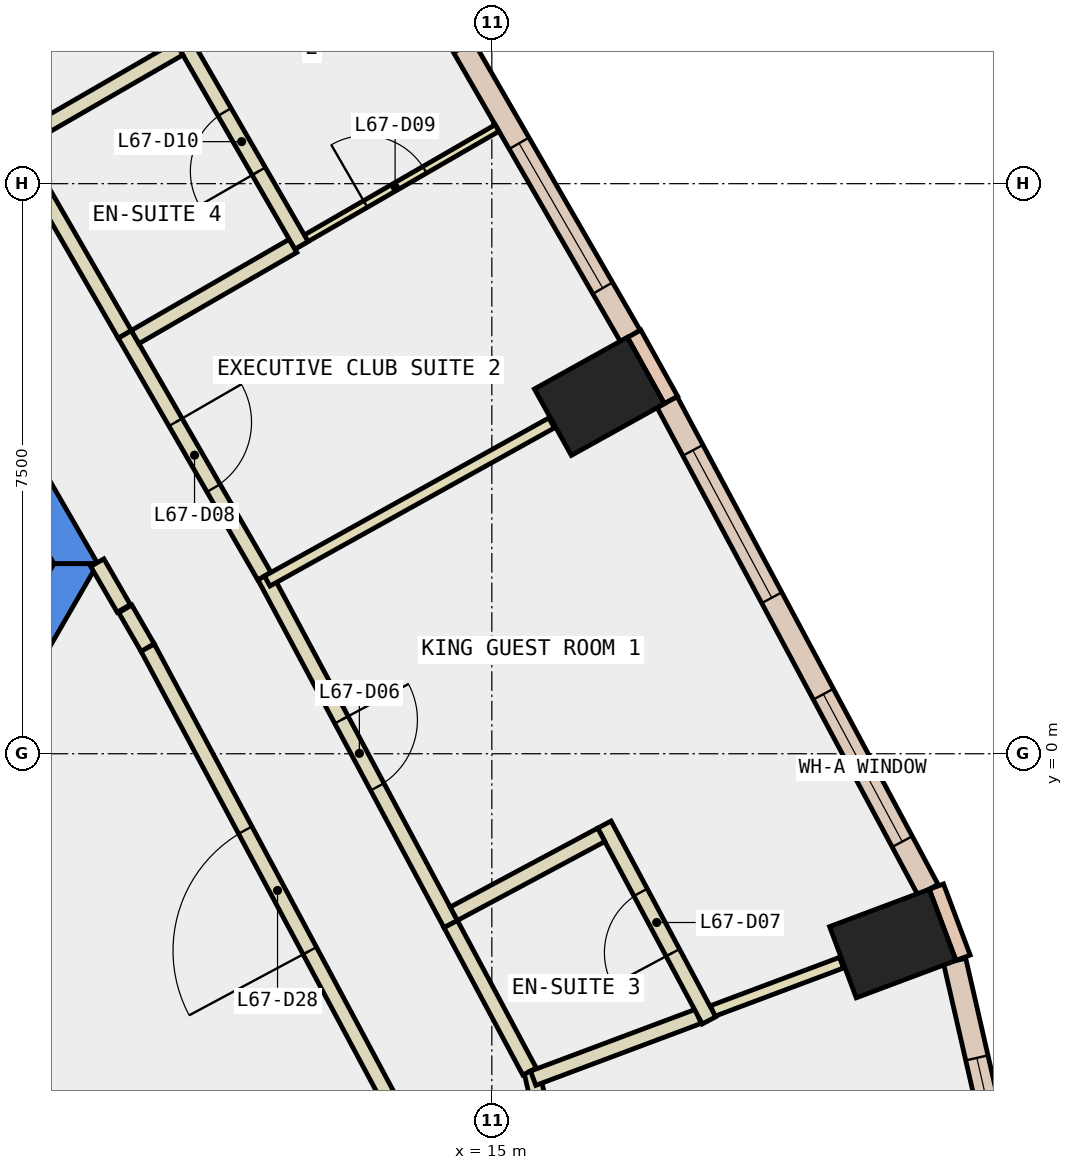
"""IFC4 building model, lengths in metres.
Left out: names, types, materials, properties, quantities, classifications, styles, units other than length and angle.
Written with IfcOpenShell. Run it as: python <this file> out.ifc"""

import sys

from ifc_helpers import new_model, si_unit, direction, frame, frame_2d, origin, origin_2d, place, context, subcontext, project, spatial, polyline, rectangle, outline, extrude, element, fill, save


model = new_model("IFC4")
c1 = context("Model", 3, precision=1e-05, world=origin(), true_north=direction((0.0, 1.0)))
c2 = subcontext(c1, "Body", "Model", "MODEL_VIEW")
j1 = project(units=[si_unit("LENGTHUNIT", "METRE"), si_unit("PLANEANGLEUNIT", "RADIAN")], contexts=[c1])
p1 = place(None, origin())
s1 = spatial("IfcSite", under=j1, at=p1, CompositionType="ELEMENT")
p2 = place(p1, origin())
s2 = spatial("IfcBuilding", under=s1, at=p2, CompositionType="ELEMENT")
p3 = place(p2, frame((0.0, 0.0, 290.0)))
s3 = spatial("IfcBuildingStorey", under=s2, at=p3, CompositionType="ELEMENT", Elevation=290.0)
for number, where, z_axis, x_axis in (
    (1, (20.275, -2.497, -0.34), (0.0, 0.0, 1.0), (-0.351, 0.936, 0.0)),
    (2, (16.415, 4.702, -0.34), (0.0, 0.0, 1.0), (-0.486, 0.874, 0.0)),
):
    element("IfcColumn", number, at=place(p3, frame(where, z_axis=z_axis, x_axis=x_axis)), inside=s3, PredefinedType="COLUMN", context=c2, shape_type="SweptSolid", body=[
        extrude(rectangle(XDim=1.0, YDim=1.4, at=origin_2d()), origin(), (0.0, 0.0, 1.0), 3.6),
    ])
p4 = place(p3, frame((0.0, 0.0, -0.34)))
e3 = element("IfcWall", 3, at=p4, inside=s3, PredefinedType="SHEAR", context=c2, shape_type="SweptSolid", body=[
    extrude(outline(polyline([(5.486, 9.998), (5.053, 9.748), (9.238, 2.5), (9.815, 2.5), (5.486, 9.998)])), origin(), (0.0, 0.0, 1.0), 3.6),
])
p5 = place(p3, frame((0.0, 0.0, -0.34)))
e4 = element("IfcWall", 4, at=p5, inside=s3, PredefinedType="SHEAR", context=c2, shape_type="SweptSolid", body=[
    extrude(outline(polyline([(4.907, -6.0), (9.815, 2.5), (9.238, 2.5), (4.619, -5.5), (4.907, -6.0)])), origin(), (0.0, 0.0, 1.0), 3.6),
])
p6 = place(p3, frame((6.279, -3.625, -0.34), z_axis=(0.0, 0.0, 1.0), x_axis=(0.866017533419, -0.500013631625, 0.0)))
e5 = element("IfcWall", 5, at=p6, inside=s3, PredefinedType="SHEAR", context=c2, shape_type="SweptSolid", body=[
    extrude(rectangle(XDim=9.0, YDim=0.8, at=frame_2d((4.5, 0.0))), origin(), (0.0, 0.0, 1.0), 3.6),
])
p7 = place(p3, frame((21.2, -2.684, 0.0), z_axis=(0.0, 0.0, 1.0), x_axis=(-0.350962844851, 0.936389385637, 0.0)))
e6 = element("IfcWall", 6, at=p7, inside=s3, PredefinedType="STANDARD", context=c2, shape_type="SweptSolid", body=[
    extrude(rectangle(XDim=1.0, YDim=0.2, at=frame_2d((0.5, 0.0))), origin(), (0.0, 0.0, 1.0), 3.26),
])
p8 = place(p3, frame((17.358, 4.653, 0.0), z_axis=(0.0, 0.0, 1.0), x_axis=(-0.485850211157, 0.874042088414, 0.0)))
e7 = element("IfcWall", 7, at=p8, inside=s3, PredefinedType="STANDARD", context=c2, shape_type="SweptSolid", body=[
    extrude(rectangle(XDim=1.0, YDim=0.2, at=frame_2d((0.5, 0.0))), origin(), (0.0, 0.0, 1.0), 3.26),
])
p9 = place(p3, frame((21.987, -6.642, 0.0), z_axis=(0.0, 0.0, 1.0), x_axis=(-0.223448307338, 0.974715781112, 0.0)))
e8 = element("IfcWall", 8, at=p9, inside=s3, PredefinedType="STANDARD", context=c2, shape_type="SweptSolid", body=[
    extrude(rectangle(XDim=4.019, YDim=0.3, at=frame_2d((2.009, 0.0))), origin(), (0.0, 0.0, 1.0), 3.26),
])
p10 = place(p9, frame((1.309, 0.0, 0.9)))
e9 = element("IfcOpeningElement", 9, at=p10, cuts=e8, PredefinedType="OPENING", context=c2, shape_type="SweptSolid", body=[
    extrude(rectangle(XDim=1.4, YDim=2.0, at=frame_2d((0.7, 1.0))), frame((0.0, 0.16, 0.0), z_axis=(0.0, -1.0, 0.0), x_axis=(1.0, 0.0, 0.0)), (0.0, 0.0, 1.0), 0.32),
])
p11 = place(p3, frame((20.739, -1.79, 0.0), z_axis=(0.0, 0.0, 1.0), x_axis=(-0.471789353675, 0.881711293882, 0.0)))
e10 = element("IfcWall", 10, at=p11, inside=s3, PredefinedType="STANDARD", context=c2, shape_type="SweptSolid", body=[
    extrude(rectangle(XDim=7.277, YDim=0.3, at=frame_2d((3.638, 0.0))), origin(), (0.0, 0.0, 1.0), 3.26),
])
p12 = place(p11, frame((0.719, 0.0, 0.9)))
e11 = element("IfcOpeningElement", 11, at=p12, cuts=e10, PredefinedType="OPENING", context=c2, shape_type="SweptSolid", body=[
    extrude(rectangle(XDim=2.2, YDim=2.0, at=frame_2d((1.1, 1.0))), frame((0.0, 0.16, 0.0), z_axis=(0.0, -1.0, 0.0), x_axis=(1.0, 0.0, 0.0)), (0.0, 0.0, 1.0), 0.32),
])
p13 = place(p11, frame((4.358, 0.0, 0.9)))
e12 = element("IfcOpeningElement", 12, at=p13, cuts=e10, PredefinedType="OPENING", context=c2, shape_type="SweptSolid", body=[
    extrude(rectangle(XDim=2.2, YDim=2.0, at=frame_2d((1.1, 1.0))), frame((0.0, 0.16, 0.0), z_axis=(0.0, -1.0, 0.0), x_axis=(1.0, 0.0, 0.0)), (0.0, 0.0, 1.0), 0.32),
])
p14 = place(p3, frame((16.821, 5.498, 0.0), z_axis=(0.0, 0.0, 1.0), x_axis=(-0.499945412946, 0.866056917341, 0.0)))
e13 = element("IfcWall", 13, at=p14, inside=s3, PredefinedType="STANDARD", context=c2, shape_type="SweptSolid", body=[
    extrude(rectangle(XDim=7.299, YDim=0.3, at=frame_2d((3.649, 0.0))), origin(), (0.0, 0.0, 1.0), 3.26),
])
p15 = place(p14, frame((0.725, 0.0, 0.9)))
e14 = element("IfcOpeningElement", 14, at=p15, cuts=e13, PredefinedType="OPENING", context=c2, shape_type="SweptSolid", body=[
    extrude(rectangle(XDim=2.2, YDim=2.0, at=frame_2d((1.1, 1.0))), frame((0.0, 0.16, 0.0), z_axis=(0.0, -1.0, 0.0), x_axis=(1.0, 0.0, 0.0)), (0.0, 0.0, 1.0), 0.32),
])
p16 = place(p14, frame((4.374, 0.0, 0.9)))
e15 = element("IfcOpeningElement", 15, at=p16, cuts=e13, PredefinedType="OPENING", context=c2, shape_type="SweptSolid", body=[
    extrude(rectangle(XDim=2.2, YDim=2.0, at=frame_2d((1.1, 1.0))), frame((0.0, 0.16, 0.0), z_axis=(0.0, -1.0, 0.0), x_axis=(1.0, 0.0, 0.0)), (0.0, 0.0, 1.0), 0.32),
])
p17 = place(p3, frame((13.89, -4.994, 0.0), z_axis=(0.0, 0.0, 1.0), x_axis=(-0.471713767504, 0.881751734644, 0.0)))
e16 = element("IfcWall", 16, at=p17, inside=s3, PredefinedType="PARTITIONING", context=c2, shape_type="SweptSolid", body=[
    extrude(rectangle(XDim=7.248, YDim=0.2, at=frame_2d((3.624, 0.0))), origin(), (0.0, 0.0, 1.0), 3.26),
])
p18 = place(p17, frame((2.724, 0.0, 0.0)))
e17 = element("IfcOpeningElement", 17, at=p18, cuts=e16, PredefinedType="OPENING", context=c2, shape_type="SweptSolid", body=[
    extrude(rectangle(XDim=1.8, YDim=2.1, at=frame_2d((0.9, 1.05))), frame((0.0, 0.11, 0.0), z_axis=(0.0, -1.0, 0.0), x_axis=(1.0, 0.0, 0.0)), (0.0, 0.0, 1.0), 0.22),
])
p19 = place(p3, frame((10.471, 1.397, 0.0), z_axis=(0.0, 0.0, 1.0), x_axis=(-0.500069990121, 0.865984991198, 0.0)))
e18 = element("IfcWall", 18, at=p19, inside=s3, PredefinedType="PARTITIONING", context=c2, shape_type="SweptSolid", body=[
    extrude(rectangle(XDim=0.588, YDim=0.2, at=frame_2d((0.294, 0.0))), origin(), (0.0, 0.0, 1.0), 3.26),
])
p20 = place(p3, frame((10.157, 1.912, 0.0), z_axis=(0.0, 0.0, 1.0), x_axis=(-0.500482383858, 0.865746720148, 0.0)))
e19 = element("IfcWall", 19, at=p20, inside=s3, PredefinedType="PARTITIONING", context=c2, shape_type="SweptSolid", body=[
    extrude(rectangle(XDim=0.695, YDim=0.2, at=frame_2d((0.348, 0.0))), origin(), (0.0, 0.0, 1.0), 3.26),
])
p21 = place(p3, frame((15.521, -4.171, 0.0), z_axis=(0.0, 0.0, 1.0), x_axis=(0.223416387785, -0.974723097946, 0.0)))
e20 = element("IfcWall", 20, at=p21, inside=s3, PredefinedType="PARTITIONING", context=c2, shape_type="SweptSolid", body=[
    extrude(rectangle(XDim=3.003, YDim=0.2, at=frame_2d((1.501, 0.0))), origin(), (0.0, 0.0, 1.0), 3.26),
])
p22 = place(p3, frame((12.009, 2.338, 0.0), z_axis=(0.0, 0.0, 1.0), x_axis=(0.471771260231, -0.88172097515, 0.0)))
e21 = element("IfcWall", 21, at=p22, inside=s3, PredefinedType="PARTITIONING", context=c2, shape_type="SweptSolid", body=[
    extrude(rectangle(XDim=5.193, YDim=0.2, at=frame_2d((2.597, 0.0))), origin(), (0.0, 0.0, 1.0), 3.26),
])
p23 = place(p22, frame((2.146, 0.0, 0.0)))
e22 = element("IfcOpeningElement", 22, at=p23, cuts=e21, PredefinedType="OPENING", context=c2, shape_type="SweptSolid", body=[
    extrude(rectangle(XDim=1.0, YDim=2.1, at=frame_2d((0.5, 1.05))), frame((0.0, 0.11, 0.0), z_axis=(0.0, -1.0, 0.0), x_axis=(1.0, 0.0, 0.0)), (0.0, 0.0, 1.0), 0.22),
])
p24 = place(p3, frame((14.459, -2.241, 0.0), z_axis=(0.0, 0.0, 1.0), x_axis=(0.471648235011, -0.881786789656, 0.0)))
e23 = element("IfcWall", 23, at=p24, inside=s3, PredefinedType="PARTITIONING", context=c2, shape_type="SweptSolid", body=[
    extrude(rectangle(XDim=2.199, YDim=0.2, at=frame_2d((1.1, 0.0))), origin(), (0.0, 0.0, 1.0), 3.26),
])
p25 = place(p3, frame((10.17, 5.519, 0.0), z_axis=(0.0, 0.0, 1.0), x_axis=(0.499990860175, -0.866030680601, 0.0)))
e24 = element("IfcWall", 24, at=p25, inside=s3, PredefinedType="PARTITIONING", context=c2, shape_type="SweptSolid", body=[
    extrude(rectangle(XDim=3.674, YDim=0.2, at=frame_2d((1.837, 0.0))), origin(), (0.0, 0.0, 1.0), 3.26),
])
p26 = place(p25, frame((1.337, 0.0, 0.0)))
e25 = element("IfcOpeningElement", 25, at=p26, cuts=e24, PredefinedType="OPENING", context=c2, shape_type="SweptSolid", body=[
    extrude(rectangle(XDim=1.0, YDim=2.1, at=frame_2d((0.5, 1.05))), frame((0.0, 0.11, 0.0), z_axis=(0.0, -1.0, 0.0), x_axis=(1.0, 0.0, 0.0)), (0.0, 0.0, 1.0), 0.22),
])
p27 = place(p3, frame((8.67, 8.117, 0.0), z_axis=(0.0, 0.0, 1.0), x_axis=(0.50002537861, -0.866010750942, 0.0)))
e26 = element("IfcWall", 26, at=p27, inside=s3, PredefinedType="PARTITIONING", context=c2, shape_type="SweptSolid", body=[
    extrude(rectangle(XDim=3.0, YDim=0.2, at=frame_2d((1.5, 0.0))), origin(), (0.0, 0.0, 1.0), 3.26),
])
p28 = place(p3, frame((17.904, -3.385, 0.0), z_axis=(0.0, 0.0, 1.0), x_axis=(0.936401128709, 0.350931512054, 0.0)))
e27 = element("IfcWall", 27, at=p28, inside=s3, PredefinedType="PARTITIONING", context=c2, shape_type="SweptSolid", body=[
    extrude(rectangle(XDim=1.812, YDim=0.15, at=frame_2d((0.906, 0.0))), origin(), (0.0, 0.0, 1.0), 3.26),
])
p29 = place(p3, frame((15.544, -4.269, 0.0), z_axis=(0.0, 0.0, 1.0), x_axis=(0.936463142424, 0.350765994477, 0.0)))
e28 = element("IfcWall", 28, at=p29, inside=s3, PredefinedType="PARTITIONING", context=c2, shape_type="SweptSolid", body=[
    extrude(rectangle(XDim=2.321, YDim=0.2, at=frame_2d((1.16, 0.0))), origin(), (0.0, 0.0, 1.0), 3.26),
])
p30 = place(p3, frame((17.857, -3.508, 0.0), z_axis=(0.0, 0.0, 1.0), x_axis=(-0.47112614664, 0.882065844454, 0.0)))
e29 = element("IfcWall", 29, at=p30, inside=s3, PredefinedType="PARTITIONING", context=c2, shape_type="SweptSolid", body=[
    extrude(rectangle(XDim=2.921, YDim=0.2, at=frame_2d((1.46, 0.0))), origin(), (0.0, 0.0, 1.0), 3.26),
])
p31 = place(p30, frame((1.01, 0.0, 0.0)))
e30 = element("IfcOpeningElement", 30, at=p31, cuts=e29, PredefinedType="OPENING", context=c2, shape_type="SweptSolid", body=[
    extrude(rectangle(XDim=0.9, YDim=2.1, at=frame_2d((0.45, 1.05))), frame((0.0, 0.11, 0.0), z_axis=(0.0, -1.0, 0.0), x_axis=(1.0, 0.0, 0.0)), (0.0, 0.0, 1.0), 0.22),
])
p32 = place(p3, frame((16.44, -1.067, 0.0), z_axis=(0.0, 0.0, 1.0), x_axis=(-0.881700916894, -0.471808746367, 0.0)))
e31 = element("IfcWall", 31, at=p32, inside=s3, PredefinedType="PARTITIONING", context=c2, shape_type="SweptSolid", body=[
    extrude(rectangle(XDim=2.2, YDim=0.2, at=frame_2d((1.1, 0.0))), origin(), (0.0, 0.0, 1.0), 3.26),
])
p33 = place(p3, frame((12.045, 2.272, 0.0), z_axis=(0.0, 0.0, 1.0), x_axis=(0.873982340973, 0.485957680943, 0.0)))
e32 = element("IfcWall", 32, at=p33, inside=s3, PredefinedType="PARTITIONING", context=c2, shape_type="SweptSolid", body=[
    extrude(rectangle(XDim=4.28, YDim=0.15, at=frame_2d((2.14, 0.0))), origin(), (0.0, 0.0, 1.0), 3.26),
])
p34 = place(p3, frame((12.385, 6.682, 0.0), z_axis=(0.0, 0.0, 1.0), x_axis=(0.865970446821, 0.500095176175, 0.0)))
e33 = element("IfcWall", 33, at=p34, inside=s3, PredefinedType="PARTITIONING", context=c2, shape_type="SweptSolid", body=[
    extrude(rectangle(XDim=3.1, YDim=0.1, at=frame_2d((1.55, 0.0))), origin(), (0.0, 0.0, 1.0), 3.26),
])
p35 = place(p34, frame((1.1, 0.0, 0.0)))
e34 = element("IfcOpeningElement", 34, at=p35, cuts=e33, PredefinedType="OPENING", context=c2, shape_type="SweptSolid", body=[
    extrude(rectangle(XDim=0.9, YDim=2.1, at=frame_2d((0.45, 1.05))), frame((0.0, 0.06, 0.0), z_axis=(0.0, -1.0, 0.0), x_axis=(1.0, 0.0, 0.0)), (0.0, 0.0, 1.0), 0.12),
])
p36 = place(p3, frame((10.306, 5.482, 0.0), z_axis=(0.0, 0.0, 1.0), x_axis=(0.866100915363, 0.499869187296, 0.0)))
e35 = element("IfcWall", 35, at=p36, inside=s3, PredefinedType="PARTITIONING", context=c2, shape_type="SweptSolid", body=[
    extrude(rectangle(XDim=2.401, YDim=0.2, at=frame_2d((1.2, 0.0))), origin(), (0.0, 0.0, 1.0), 3.26),
])
p37 = place(p3, frame((12.496, 6.689, 0.0), z_axis=(0.0, 0.0, 1.0), x_axis=(-0.500039995618, 0.866002311072, 0.0)))
e36 = element("IfcWall", 36, at=p37, inside=s3, PredefinedType="PARTITIONING", context=c2, shape_type="SweptSolid", body=[
    extrude(rectangle(XDim=3.15, YDim=0.2, at=frame_2d((1.575, 0.0))), origin(), (0.0, 0.0, 1.0), 3.26),
])
p38 = place(p37, frame((1.125, 0.0, 0.0)))
e37 = element("IfcOpeningElement", 37, at=p38, cuts=e36, PredefinedType="OPENING", context=c2, shape_type="SweptSolid", body=[
    extrude(rectangle(XDim=0.9, YDim=2.1, at=frame_2d((0.45, 1.05))), frame((0.0, 0.11, 0.0), z_axis=(0.0, -1.0, 0.0), x_axis=(1.0, 0.0, 0.0)), (0.0, 0.0, 1.0), 0.22),
])
p39 = place(p3, frame((10.885, 9.28, 0.0), z_axis=(0.0, 0.0, 1.0), x_axis=(-0.866022959057, -0.500004234368, 0.0)))
e38 = element("IfcWall", 38, at=p39, inside=s3, PredefinedType="PARTITIONING", context=c2, shape_type="SweptSolid", body=[
    extrude(rectangle(XDim=2.5, YDim=0.2, at=frame_2d((1.25, 0.0))), origin(), (0.0, 0.0, 1.0), 3.26),
])
p40 = place(p3, frame((7.989, 9.295, 0.0), z_axis=(0.0, 0.0, 1.0), x_axis=(0.857801856135, 0.513980520654, 0.0)))
e39 = element("IfcWall", 39, at=p40, inside=s3, PredefinedType="PARTITIONING", context=c2, shape_type="SweptSolid", body=[
    extrude(rectangle(XDim=2.3, YDim=0.2, at=frame_2d((1.15, 0.0))), origin(), (0.0, 0.0, 1.0), 3.26),
])
p41 = place(p10, origin())
e40 = element("IfcWindow", 40, at=p41, inside=s3, PartitioningType="SINGLE_PANEL", PredefinedType="WINDOW", context=c2, shape_type="SweptSolid", body=[
    extrude(rectangle(XDim=1.4, YDim=2.0, at=frame_2d((0.7, 1.0))), frame((0.0, 0.03, 0.0), z_axis=(0.0, -1.0, 0.0), x_axis=(1.0, 0.0, 0.0)), (0.0, 0.0, 1.0), 0.06),
])
fill(e9, e40)
p42 = place(p12, origin())
e41 = element("IfcWindow", 41, at=p42, inside=s3, PartitioningType="SINGLE_PANEL", PredefinedType="WINDOW", context=c2, shape_type="SweptSolid", body=[
    extrude(rectangle(XDim=2.2, YDim=2.0, at=frame_2d((1.1, 1.0))), frame((0.0, 0.03, 0.0), z_axis=(0.0, -1.0, 0.0), x_axis=(1.0, 0.0, 0.0)), (0.0, 0.0, 1.0), 0.06),
])
fill(e11, e41)
p43 = place(p13, origin())
e42 = element("IfcWindow", 42, at=p43, inside=s3, PartitioningType="SINGLE_PANEL", PredefinedType="WINDOW", context=c2, shape_type="SweptSolid", body=[
    extrude(rectangle(XDim=2.2, YDim=2.0, at=frame_2d((1.1, 1.0))), frame((0.0, 0.03, 0.0), z_axis=(0.0, -1.0, 0.0), x_axis=(1.0, 0.0, 0.0)), (0.0, 0.0, 1.0), 0.06),
])
fill(e12, e42)
p44 = place(p15, origin())
e43 = element("IfcWindow", 43, at=p44, inside=s3, PartitioningType="SINGLE_PANEL", PredefinedType="WINDOW", context=c2, shape_type="SweptSolid", body=[
    extrude(rectangle(XDim=2.2, YDim=2.0, at=frame_2d((1.1, 1.0))), frame((0.0, 0.03, 0.0), z_axis=(0.0, -1.0, 0.0), x_axis=(1.0, 0.0, 0.0)), (0.0, 0.0, 1.0), 0.06),
])
fill(e14, e43)
p45 = place(p23, origin())
e44 = element("IfcDoor", 44, at=p45, inside=s3, OperationType="SINGLE_SWING_LEFT", PredefinedType="DOOR", context=c2, shape_type="SweptSolid", body=[
    extrude(rectangle(XDim=1.0, YDim=2.1, at=frame_2d((0.5, 1.05))), frame((0.0, 0.025, 0.0), z_axis=(0.0, -1.0, 0.0), x_axis=(1.0, 0.0, 0.0)), (0.0, 0.0, 1.0), 0.05),
])
fill(e22, e44)
p46 = place(p31, origin())
e45 = element("IfcDoor", 45, at=p46, inside=s3, OperationType="SINGLE_SWING_RIGHT", PredefinedType="DOOR", context=c2, shape_type="SweptSolid", body=[
    extrude(rectangle(XDim=0.9, YDim=2.1, at=frame_2d((0.45, 1.05))), frame((0.0, 0.025, 0.0), z_axis=(0.0, -1.0, 0.0), x_axis=(1.0, 0.0, 0.0)), (0.0, 0.0, 1.0), 0.05),
])
fill(e30, e45)
p47 = place(p26, origin())
e46 = element("IfcDoor", 46, at=p47, inside=s3, OperationType="SINGLE_SWING_LEFT", PredefinedType="DOOR", context=c2, shape_type="SweptSolid", body=[
    extrude(rectangle(XDim=1.0, YDim=2.1, at=frame_2d((0.5, 1.05))), frame((0.0, 0.025, 0.0), z_axis=(0.0, -1.0, 0.0), x_axis=(1.0, 0.0, 0.0)), (0.0, 0.0, 1.0), 0.05),
])
fill(e25, e46)
p48 = place(p35, origin())
e47 = element("IfcDoor", 47, at=p48, inside=s3, OperationType="SINGLE_SWING_RIGHT", PredefinedType="DOOR", context=c2, shape_type="SweptSolid", body=[
    extrude(rectangle(XDim=0.9, YDim=2.1, at=frame_2d((0.45, 1.05))), frame((0.0, 0.025, 0.0), z_axis=(0.0, -1.0, 0.0), x_axis=(1.0, 0.0, 0.0)), (0.0, 0.0, 1.0), 0.05),
])
fill(e34, e47)
p49 = place(p38, origin())
e48 = element("IfcDoor", 48, at=p49, inside=s3, OperationType="SINGLE_SWING_RIGHT", PredefinedType="DOOR", context=c2, shape_type="SweptSolid", body=[
    extrude(rectangle(XDim=0.9, YDim=2.1, at=frame_2d((0.45, 1.05))), frame((0.0, 0.025, 0.0), z_axis=(0.0, -1.0, 0.0), x_axis=(1.0, 0.0, 0.0)), (0.0, 0.0, 1.0), 0.05),
])
fill(e37, e48)
p50 = place(p18, origin())
e49 = element("IfcDoor", 49, at=p50, inside=s3, OperationType="DOUBLE_DOOR_SINGLE_SWING", PredefinedType="DOOR", context=c2, shape_type="SweptSolid", body=[
    extrude(rectangle(XDim=1.8, YDim=2.1, at=frame_2d((0.9, 1.05))), frame((0.0, 0.025, 0.0), z_axis=(0.0, -1.0, 0.0), x_axis=(1.0, 0.0, 0.0)), (0.0, 0.0, 1.0), 0.05),
])
fill(e17, e49)
save(model, sys.argv[1])
